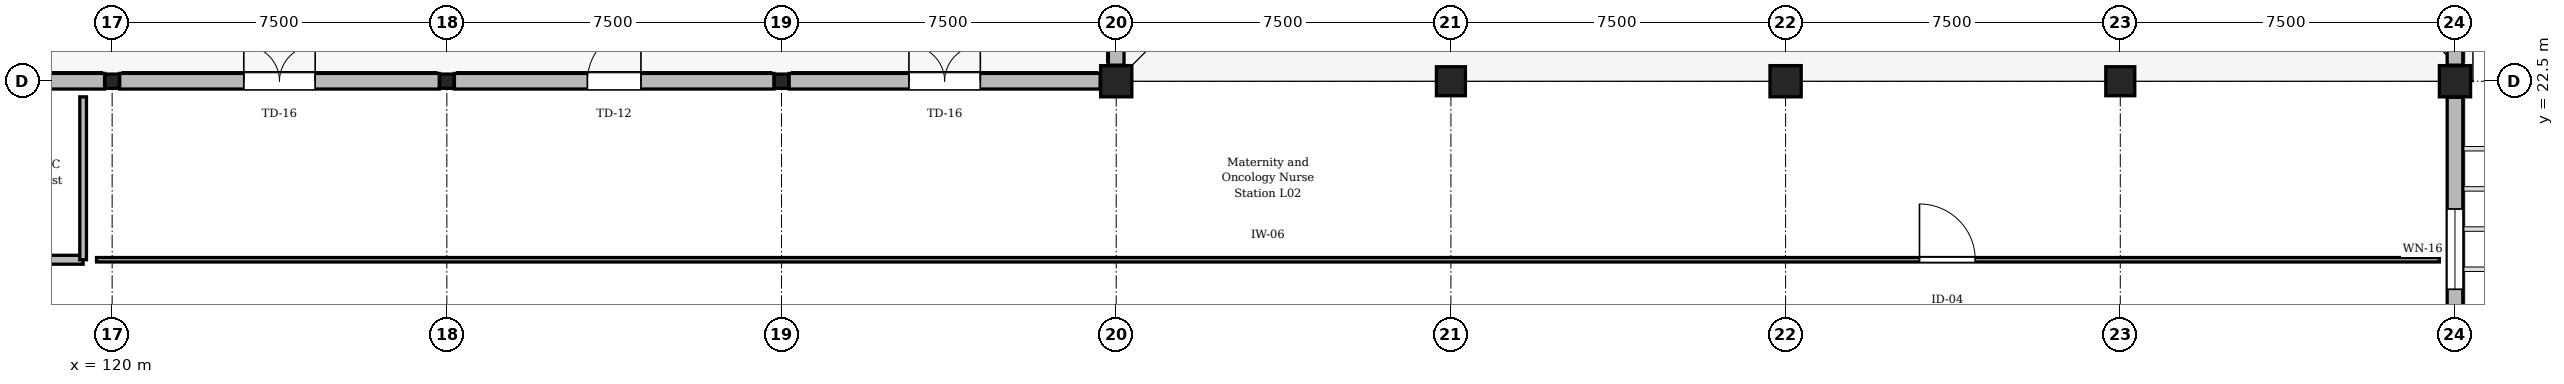
"""IFC4 building model, lengths in metres.
Left out: names, types, materials, properties, quantities, classifications, styles, units other than length and angle.
Written with IfcOpenShell. Run it as: python <this file> out.ifc"""

import sys

from ifc_helpers import new_model, si_unit, direction, frame, frame_2d, origin, origin_2d, place, context, subcontext, project, spatial, rectangle, extrude, element, fill, save


model = new_model("IFC4")
c1 = context("Model", 3, precision=1e-05, world=origin(), true_north=direction((0.0, 1.0)))
c2 = subcontext(c1, "Body", "Model", "MODEL_VIEW")
j1 = project(units=[si_unit("LENGTHUNIT", "METRE"), si_unit("PLANEANGLEUNIT", "RADIAN")], contexts=[c1])
p1 = place(None, origin())
s1 = spatial("IfcSite", under=j1, at=p1, CompositionType="ELEMENT")
p2 = place(p1, origin())
s2 = spatial("IfcBuilding", under=s1, at=p2, CompositionType="ELEMENT")
p3 = place(p2, frame((0.0, 0.0, 9.3)))
s3 = spatial("IfcBuildingStorey", under=s2, at=p3, CompositionType="ELEMENT", Elevation=9.3)
for number, where, z_axis, x_axis in (
    (1, (120.0, 22.5, 0.0), (0.0, 0.0, 1.0), (1.0, 0.0, 0.0)),
    (2, (127.5, 22.5, 0.0), (0.0, 0.0, 1.0), (1.0, 0.0, 0.0)),
    (3, (135.0, 22.5, 0.0), (0.0, 0.0, 1.0), (1.0, 0.0, 0.0)),
):
    element("IfcColumn", number, at=place(p3, frame(where, z_axis=z_axis, x_axis=x_axis)), inside=s3, PredefinedType="COLUMN", context=c2, shape_type="SweptSolid", body=[
        extrude(rectangle(XDim=0.32, YDim=0.32, at=origin_2d()), origin(), (0.0, 0.0, 1.0), 4.8),
    ])
p4 = place(p3, frame((142.5, 22.5, 0.0), z_axis=(0.0, 0.0, 1.0), x_axis=(1.0, 0.0, 0.0)))
e4 = element("IfcColumn", 4, at=p4, inside=s3, PredefinedType="COLUMN", context=c2, shape_type="SweptSolid", body=[
    extrude(rectangle(XDim=0.7, YDim=0.7, at=origin_2d()), origin(), (0.0, 0.0, 1.0), 4.8),
])
p5 = place(p3, frame((150.0, 22.5, 0.0), z_axis=(0.0, 0.0, 1.0), x_axis=(1.0, 0.0, 0.0)))
e5 = element("IfcColumn", 5, at=p5, inside=s3, PredefinedType="COLUMN", context=c2, shape_type="SweptSolid", body=[
    extrude(rectangle(XDim=0.65, YDim=0.65, at=origin_2d()), origin(), (0.0, 0.0, 1.0), 4.8),
])
p6 = place(p3, frame((157.5, 22.5, 0.0), z_axis=(0.0, 0.0, 1.0), x_axis=(1.0, 0.0, 0.0)))
e6 = element("IfcColumn", 6, at=p6, inside=s3, PredefinedType="COLUMN", context=c2, shape_type="SweptSolid", body=[
    extrude(rectangle(XDim=0.7, YDim=0.7, at=origin_2d()), origin(), (0.0, 0.0, 1.0), 4.8),
])
p7 = place(p3, frame((165.0, 22.5, 0.0), z_axis=(0.0, 0.0, 1.0), x_axis=(1.0, 0.0, 0.0)))
e7 = element("IfcColumn", 7, at=p7, inside=s3, PredefinedType="COLUMN", context=c2, shape_type="SweptSolid", body=[
    extrude(rectangle(XDim=0.65, YDim=0.65, at=origin_2d()), origin(), (0.0, 0.0, 1.0), 4.8),
])
p8 = place(p3, frame((172.5, 22.5, 0.0), z_axis=(0.0, 0.0, 1.0), x_axis=(1.0, 0.0, 0.0)))
e8 = element("IfcColumn", 8, at=p8, inside=s3, PredefinedType="COLUMN", context=c2, shape_type="SweptSolid", body=[
    extrude(rectangle(XDim=0.7, YDim=0.7, at=origin_2d()), origin(), (0.0, 0.0, 1.0), 4.8),
])
p9 = place(p3, frame((112.67, 22.5, 0.0), z_axis=(0.0, 0.0, 1.0), x_axis=(1.0, 0.0, 0.0)))
e9 = element("IfcWall", 9, at=p9, inside=s3, PredefinedType="STANDARD", context=c2, shape_type="SweptSolid", body=[
    extrude(rectangle(XDim=7.16, YDim=0.35, at=frame_2d((3.58, 0.0))), origin(), (0.0, 0.0, 1.0), 3.95),
])
p10 = place(p9, frame((2.98, 0.0, 0.0)))
e10 = element("IfcOpeningElement", 10, at=p10, cuts=e9, PredefinedType="OPENING", context=c2, shape_type="SweptSolid", body=[
    extrude(rectangle(XDim=1.2, YDim=2.3, at=frame_2d((0.6, 1.15))), frame((0.0, 0.185, 0.0), z_axis=(0.0, -1.0, 0.0), x_axis=(1.0, 0.0, 0.0)), (0.0, 0.0, 1.0), 0.37),
])
p11 = place(p3, frame((120.17, 22.5, 0.0), z_axis=(0.0, 0.0, 1.0), x_axis=(1.0, 0.0, 0.0)))
e11 = element("IfcWall", 11, at=p11, inside=s3, PredefinedType="STANDARD", context=c2, shape_type="SweptSolid", body=[
    extrude(rectangle(XDim=7.16, YDim=0.35, at=frame_2d((3.58, 0.0))), origin(), (0.0, 0.0, 1.0), 3.95),
])
p12 = place(p11, frame((2.78, 0.0, 0.0)))
e12 = element("IfcOpeningElement", 12, at=p12, cuts=e11, PredefinedType="OPENING", context=c2, shape_type="SweptSolid", body=[
    extrude(rectangle(XDim=1.6, YDim=2.35, at=frame_2d((0.8, 1.175))), frame((0.0, 0.185, 0.0), z_axis=(0.0, -1.0, 0.0), x_axis=(1.0, 0.0, 0.0)), (0.0, 0.0, 1.0), 0.37),
])
p13 = place(p3, frame((127.67, 22.5, 0.0), z_axis=(0.0, 0.0, 1.0), x_axis=(1.0, 0.0, 0.0)))
e13 = element("IfcWall", 13, at=p13, inside=s3, PredefinedType="STANDARD", context=c2, shape_type="SweptSolid", body=[
    extrude(rectangle(XDim=7.16, YDim=0.35, at=frame_2d((3.58, 0.0))), origin(), (0.0, 0.0, 1.0), 3.95),
])
p14 = place(p13, frame((2.98, 0.0, 0.0)))
e14 = element("IfcOpeningElement", 14, at=p14, cuts=e13, PredefinedType="OPENING", context=c2, shape_type="SweptSolid", body=[
    extrude(rectangle(XDim=1.2, YDim=2.3, at=frame_2d((0.6, 1.15))), frame((0.0, 0.185, 0.0), z_axis=(0.0, -1.0, 0.0), x_axis=(1.0, 0.0, 0.0)), (0.0, 0.0, 1.0), 0.37),
])
p15 = place(p3, frame((135.17, 22.5, 0.0), z_axis=(0.0, 0.0, 1.0), x_axis=(1.0, 0.0, 0.0)))
e15 = element("IfcWall", 15, at=p15, inside=s3, PredefinedType="STANDARD", context=c2, shape_type="SweptSolid", body=[
    extrude(rectangle(XDim=6.97, YDim=0.35, at=frame_2d((3.485, 0.0))), origin(), (0.0, 0.0, 1.0), 3.95),
])
p16 = place(p15, frame((2.685, 0.0, 0.0)))
e16 = element("IfcOpeningElement", 16, at=p16, cuts=e15, PredefinedType="OPENING", context=c2, shape_type="SweptSolid", body=[
    extrude(rectangle(XDim=1.6, YDim=2.35, at=frame_2d((0.8, 1.175))), frame((0.0, 0.185, 0.0), z_axis=(0.0, -1.0, 0.0), x_axis=(1.0, 0.0, 0.0)), (0.0, 0.0, 1.0), 0.37),
])
p17 = place(p3, frame((142.5, 22.86, 0.0), z_axis=(0.0, 0.0, 1.0), x_axis=(0.0, 1.0, 0.0)))
e17 = element("IfcWall", 17, at=p17, inside=s3, PredefinedType="STANDARD", context=c2, shape_type="SweptSolid", body=[
    extrude(rectangle(XDim=8.33, YDim=0.35, at=frame_2d((4.165, 0.0))), origin(), (0.0, 0.0, 1.0), 4.55),
])
p18 = place(p17, frame((3.565, 0.0, 0.0)))
e18 = element("IfcOpeningElement", 18, at=p18, cuts=e17, PredefinedType="OPENING", context=c2, shape_type="SweptSolid", body=[
    extrude(rectangle(XDim=1.2, YDim=2.3, at=frame_2d((0.6, 1.15))), frame((0.0, 0.185, 0.0), z_axis=(0.0, -1.0, 0.0), x_axis=(1.0, 0.0, 0.0)), (0.0, 0.0, 1.0), 0.37),
])
p19 = place(p3, frame((172.5, 22.14, 0.0), z_axis=(0.0, 0.0, 1.0), x_axis=(0.0, -1.0, 0.0)))
e19 = element("IfcWall", 19, at=p19, inside=s3, PredefinedType="STANDARD", context=c2, shape_type="SweptSolid", body=[
    extrude(rectangle(XDim=6.805, YDim=0.35, at=frame_2d((3.402, 0.0))), origin(), (0.0, 0.0, 1.0), 3.95),
])
p20 = place(p19, frame((2.502, 0.0, 0.9)))
e20 = element("IfcOpeningElement", 20, at=p20, cuts=e19, PredefinedType="OPENING", context=c2, shape_type="SweptSolid", body=[
    extrude(rectangle(XDim=1.8, YDim=1.8, at=frame_2d((0.9, 0.9))), frame((0.0, 0.185, 0.0), z_axis=(0.0, -1.0, 0.0), x_axis=(1.0, 0.0, 0.0)), (0.0, 0.0, 1.0), 0.37),
])
p21 = place(p3, frame((172.5, 31.19, 0.0), z_axis=(0.0, 0.0, 1.0), x_axis=(0.0, -1.0, 0.0)))
e21 = element("IfcWall", 21, at=p21, inside=s3, PredefinedType="STANDARD", context=c2, shape_type="SweptSolid", body=[
    extrude(rectangle(XDim=8.33, YDim=0.35, at=frame_2d((4.165, 0.0))), origin(), (0.0, 0.0, 1.0), 4.55),
])
p22 = place(p21, frame((3.265, 0.0, 0.9)))
e22 = element("IfcOpeningElement", 22, at=p22, cuts=e21, PredefinedType="OPENING", context=c2, shape_type="SweptSolid", body=[
    extrude(rectangle(XDim=1.8, YDim=2.4, at=frame_2d((0.9, 1.2))), frame((0.0, 0.185, 0.0), z_axis=(0.0, -1.0, 0.0), x_axis=(1.0, 0.0, 0.0)), (0.0, 0.0, 1.0), 0.37),
])
p23 = place(p3, frame((112.85, 18.5, 0.0), z_axis=(0.0, 0.0, 1.0), x_axis=(1.0, 0.0, 0.0)))
e23 = element("IfcWall", 23, at=p23, inside=s3, PredefinedType="STANDARD", context=c2, shape_type="SweptSolid", body=[
    extrude(rectangle(XDim=6.5, YDim=0.2, at=frame_2d((3.25, 0.0))), origin(), (0.0, 0.0, 1.0), 4.535),
])
p24 = place(p23, frame((2.775, 0.0, 0.0)))
e24 = element("IfcOpeningElement", 24, at=p24, cuts=e23, PredefinedType="OPENING", context=c2, shape_type="SweptSolid", body=[
    extrude(rectangle(XDim=0.95, YDim=2.15, at=frame_2d((0.475, 1.075))), frame((0.0, 0.11, 0.0), z_axis=(0.0, -1.0, 0.0), x_axis=(1.0, 0.0, 0.0)), (0.0, 0.0, 1.0), 0.22),
])
p25 = place(p3, frame((119.65, 18.5, 0.0), z_axis=(0.0, 0.0, 1.0), x_axis=(1.0, 0.0, 0.0)))
e25 = element("IfcWall", 25, at=p25, inside=s3, PredefinedType="PARTITIONING", context=c2, shape_type="SweptSolid", body=[
    extrude(rectangle(XDim=52.5, YDim=0.1, at=frame_2d((26.25, 0.0))), origin(), (0.0, 0.0, 1.0), 4.535),
])
p26 = place(p25, frame((40.85, 0.0, 0.0)))
e26 = element("IfcOpeningElement", 26, at=p26, cuts=e25, PredefinedType="OPENING", context=c2, shape_type="SweptSolid", body=[
    extrude(rectangle(XDim=1.25, YDim=2.2, at=frame_2d((0.625, 1.1))), frame((0.0, 0.06, 0.0), z_axis=(0.0, -1.0, 0.0), x_axis=(1.0, 0.0, 0.0)), (0.0, 0.0, 1.0), 0.12),
])
p27 = place(p3, frame((119.35, 18.5, 0.0), z_axis=(0.0, 0.0, 1.0), x_axis=(0.0, 1.0, 0.0)))
e27 = element("IfcWall", 27, at=p27, inside=s3, PredefinedType="PARTITIONING", context=c2, shape_type="SweptSolid", body=[
    extrude(rectangle(XDim=3.65, YDim=0.15, at=frame_2d((1.825, 0.0))), origin(), (0.0, 0.0, 1.0), 4.535),
])
p28 = place(p12, origin())
e28 = element("IfcDoor", 28, at=p28, inside=s3, OperationType="DOUBLE_DOOR_SINGLE_SWING", PredefinedType="DOOR", context=c2, shape_type="SweptSolid", body=[
    extrude(rectangle(XDim=1.6, YDim=2.35, at=frame_2d((0.8, 1.175))), frame((0.0, 0.025, 0.0), z_axis=(0.0, -1.0, 0.0), x_axis=(1.0, 0.0, 0.0)), (0.0, 0.0, 1.0), 0.05),
])
fill(e12, e28)
p29 = place(p14, origin())
e29 = element("IfcDoor", 29, at=p29, inside=s3, OperationType="SINGLE_SWING_RIGHT", PredefinedType="DOOR", context=c2, shape_type="SweptSolid", body=[
    extrude(rectangle(XDim=1.2, YDim=2.3, at=frame_2d((0.6, 1.15))), frame((0.0, 0.025, 0.0), z_axis=(0.0, -1.0, 0.0), x_axis=(1.0, 0.0, 0.0)), (0.0, 0.0, 1.0), 0.05),
])
fill(e14, e29)
p30 = place(p16, origin())
e30 = element("IfcDoor", 30, at=p30, inside=s3, OperationType="DOUBLE_DOOR_SINGLE_SWING", PredefinedType="DOOR", context=c2, shape_type="SweptSolid", body=[
    extrude(rectangle(XDim=1.6, YDim=2.35, at=frame_2d((0.8, 1.175))), frame((0.0, 0.025, 0.0), z_axis=(0.0, -1.0, 0.0), x_axis=(1.0, 0.0, 0.0)), (0.0, 0.0, 1.0), 0.05),
])
fill(e16, e30)
p31 = place(p20, origin())
e31 = element("IfcWindow", 31, at=p31, inside=s3, PartitioningType="SINGLE_PANEL", PredefinedType="WINDOW", context=c2, shape_type="SweptSolid", body=[
    extrude(rectangle(XDim=1.8, YDim=1.8, at=frame_2d((0.9, 0.9))), frame((0.0, 0.03, 0.0), z_axis=(0.0, -1.0, 0.0), x_axis=(1.0, 0.0, 0.0)), (0.0, 0.0, 1.0), 0.06),
])
fill(e20, e31)
p32 = place(p26, origin())
e32 = element("IfcDoor", 32, at=p32, inside=s3, OperationType="SINGLE_SWING_LEFT", PredefinedType="DOOR", context=c2, shape_type="SweptSolid", body=[
    extrude(rectangle(XDim=1.25, YDim=2.2, at=frame_2d((0.625, 1.1))), frame((0.0, 0.025, 0.0), z_axis=(0.0, -1.0, 0.0), x_axis=(1.0, 0.0, 0.0)), (0.0, 0.0, 1.0), 0.05),
])
fill(e26, e32)
save(model, sys.argv[1])
